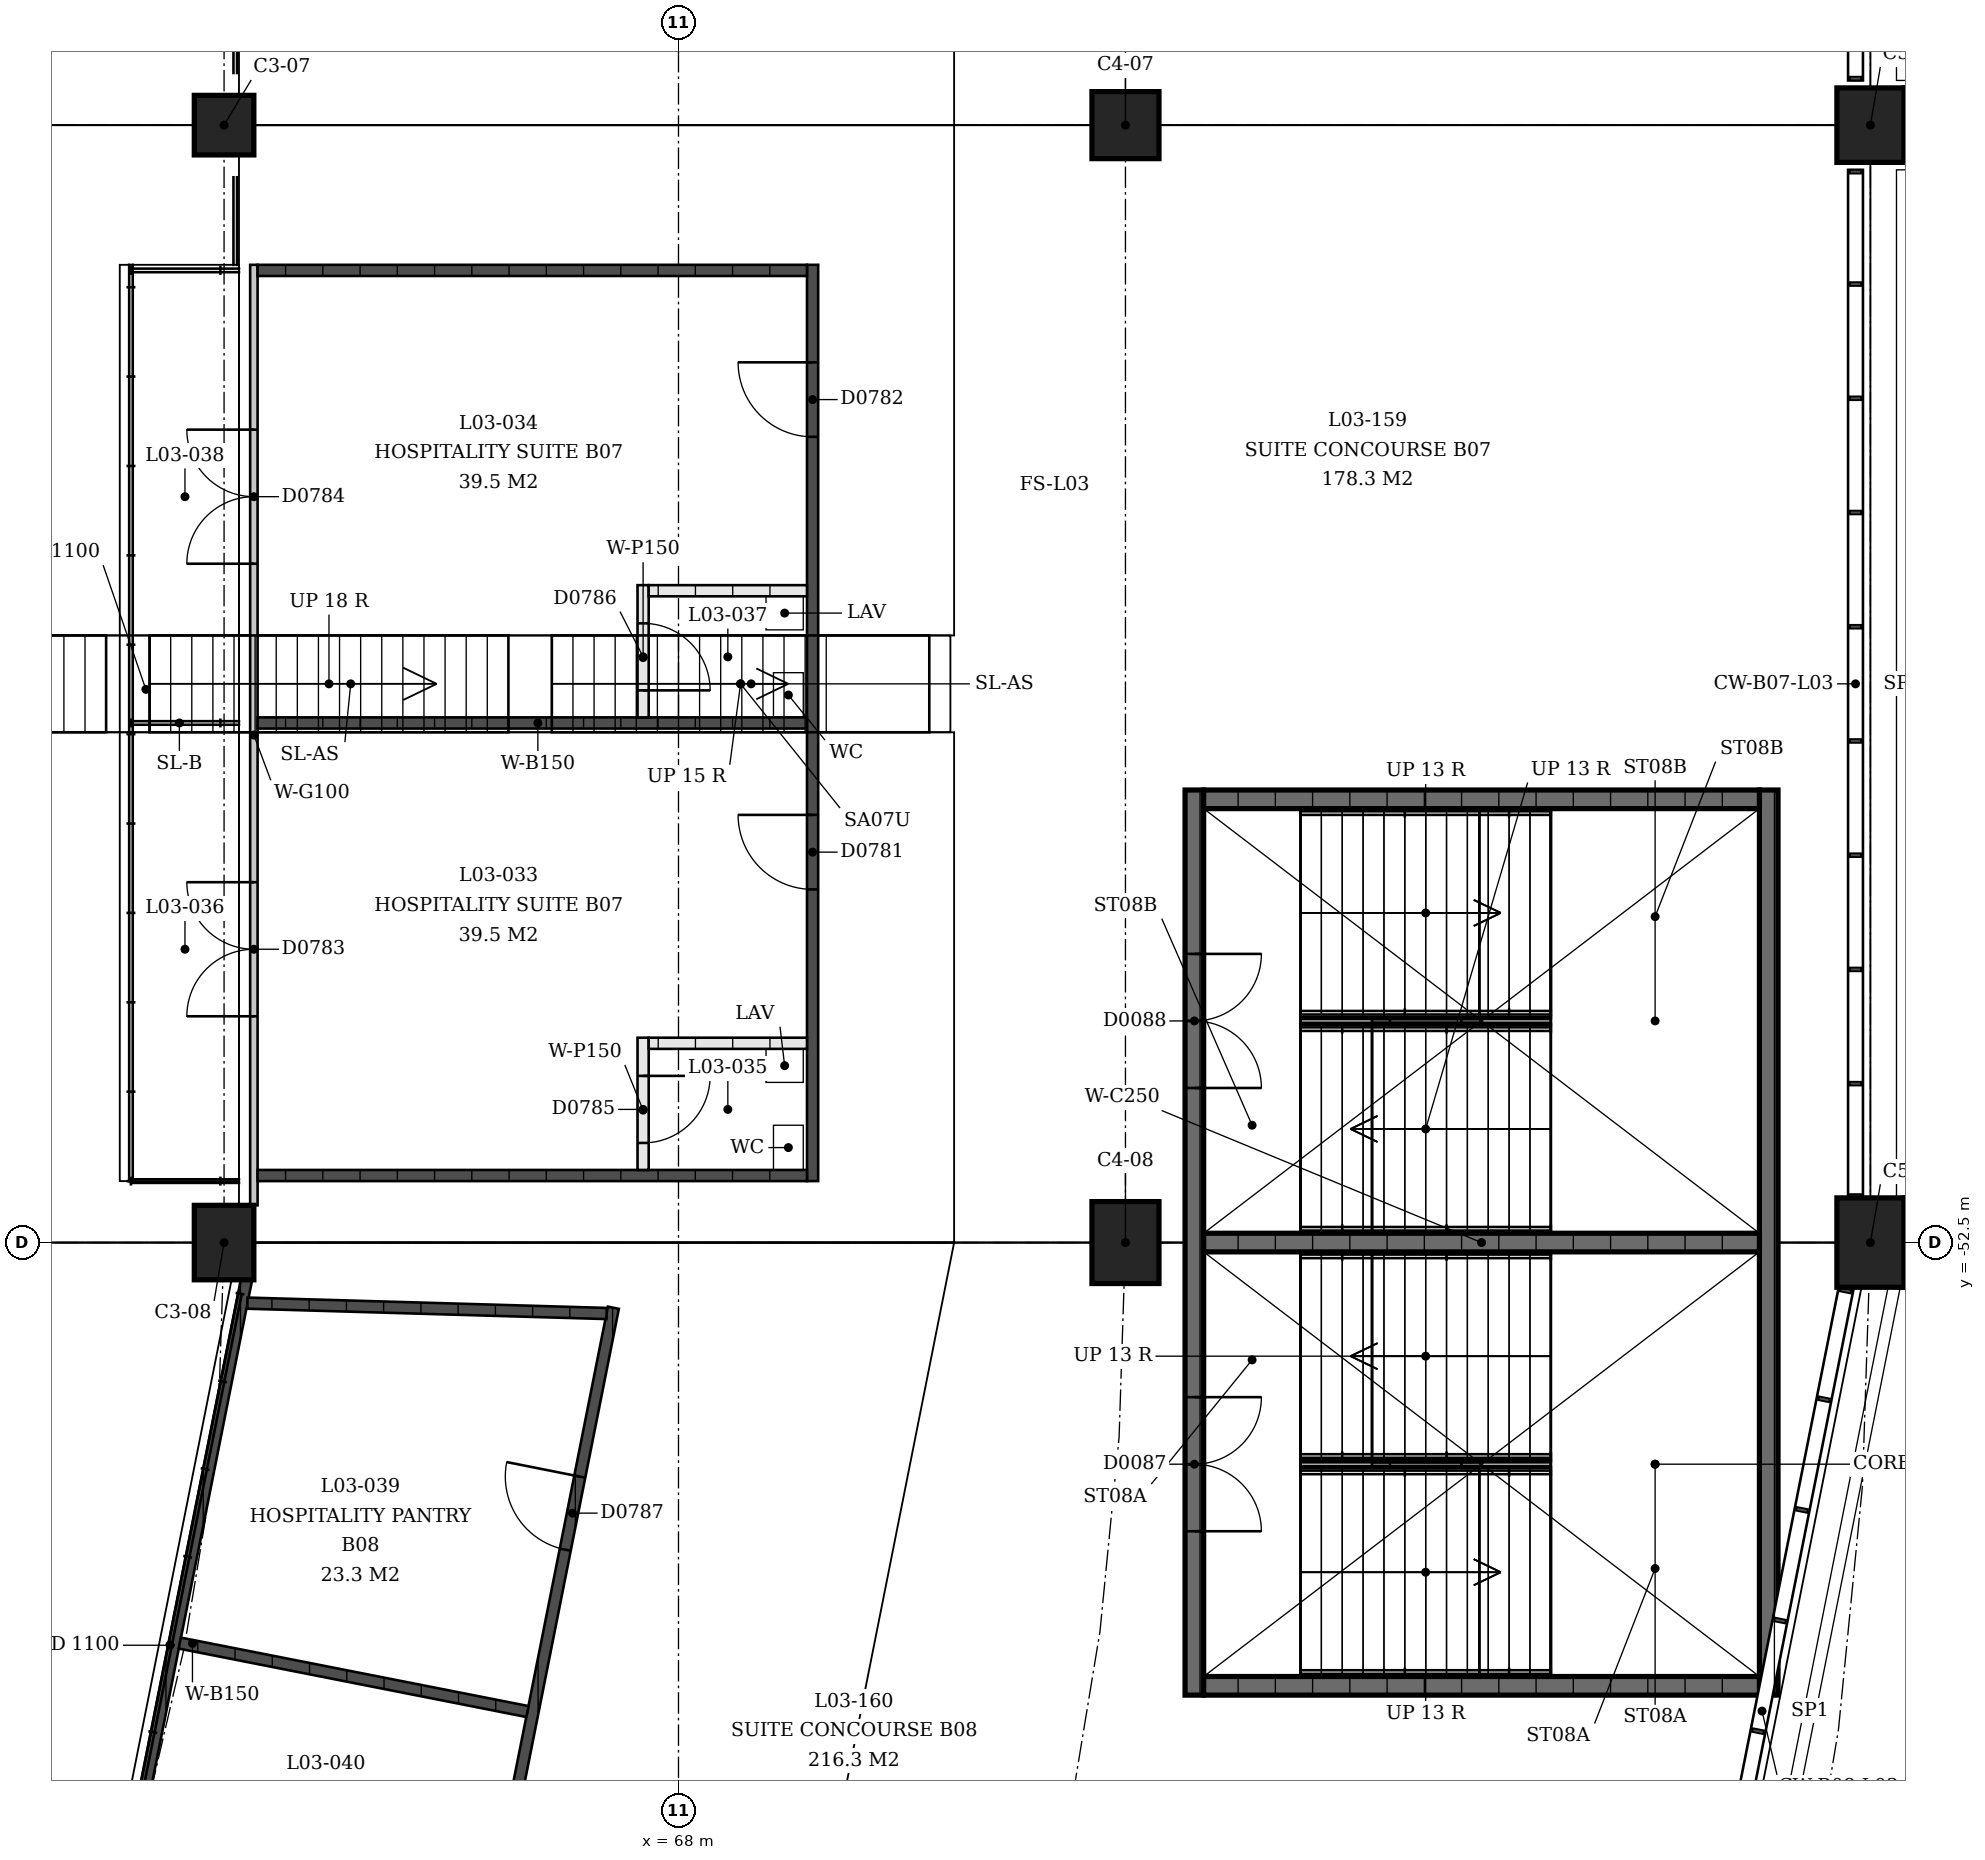
"""IFC4 building model, lengths in metres.
Left out: names, types, materials, properties, quantities, classifications, styles, units other than length and angle.
Written with IfcOpenShell. Run it as: python <this file> out.ifc"""

import sys

from ifc_helpers import new_model, si_unit, direction, frame, frame_2d, origin, origin_2d, place, context, subcontext, project, spatial, rectangle, extrude, element, fill, save


model = new_model("IFC4")
c1 = context("Model", 3, precision=1e-05, world=origin(), true_north=direction((0.0, 1.0)))
c2 = subcontext(c1, "Body", "Model", "MODEL_VIEW")
j1 = project(units=[si_unit("LENGTHUNIT", "METRE"), si_unit("PLANEANGLEUNIT", "RADIAN")], contexts=[c1])
p1 = place(None, origin())
s1 = spatial("IfcSite", under=j1, at=p1, CompositionType="ELEMENT")
p2 = place(p1, origin())
s2 = spatial("IfcBuilding", under=s1, at=p2, CompositionType="ELEMENT")
p3 = place(p2, frame((0.0, 0.0, 13.5)))
s3 = spatial("IfcBuildingStorey", under=s2, at=p3, CompositionType="ELEMENT", Elevation=13.5)
p4 = place(p3, frame((61.9, -37.5, 0.0), z_axis=(0.0, 0.0, 1.0), x_axis=(0.0, 1.0, 0.0)))
e1 = element("IfcColumn", 1, at=p4, inside=s3, PredefinedType="COLUMN", context=c2, shape_type="SweptSolid", body=[
    extrude(rectangle(XDim=0.8, YDim=0.8, at=origin_2d()), origin(), (0.0, 0.0, 1.0), 2.033),
])
p5 = place(p3, frame((74.0, -37.5, 0.0), z_axis=(0.0, 0.0, 1.0), x_axis=(0.0, 1.0, 0.0)))
e2 = element("IfcColumn", 2, at=p5, inside=s3, PredefinedType="COLUMN", context=c2, shape_type="SweptSolid", body=[
    extrude(rectangle(XDim=0.9, YDim=0.9, at=origin_2d()), origin(), (0.0, 0.0, 1.0), 4.5),
])
p6 = place(p3, frame((84.0, -37.5, 0.0), z_axis=(0.0, 0.0, 1.0), x_axis=(0.0, 1.0, 0.0)))
e3 = element("IfcColumn", 3, at=p6, inside=s3, PredefinedType="COLUMN", context=c2, shape_type="SweptSolid", body=[
    extrude(rectangle(XDim=1.0, YDim=0.9, at=origin_2d()), origin(), (0.0, 0.0, 1.0), 4.5),
])
p7 = place(p3, frame((61.9, -52.5, 0.0), z_axis=(0.0, 0.0, 1.0), x_axis=(0.0, 1.0, 0.0)))
e4 = element("IfcColumn", 4, at=p7, inside=s3, PredefinedType="COLUMN", context=c2, shape_type="SweptSolid", body=[
    extrude(rectangle(XDim=1.0, YDim=0.8, at=origin_2d()), origin(), (0.0, 0.0, 1.0), 2.033),
])
p8 = place(p3, frame((74.0, -52.5, 0.0), z_axis=(0.0, 0.0, 1.0), x_axis=(0.0, 1.0, 0.0)))
e5 = element("IfcColumn", 5, at=p8, inside=s3, PredefinedType="COLUMN", context=c2, shape_type="SweptSolid", body=[
    extrude(rectangle(XDim=1.1, YDim=0.9, at=origin_2d()), origin(), (0.0, 0.0, 1.0), 4.5),
])
p9 = place(p3, frame((84.0, -52.5, 0.0), z_axis=(0.0, 0.0, 1.0), x_axis=(0.0, 1.0, 0.0)))
e6 = element("IfcColumn", 6, at=p9, inside=s3, PredefinedType="COLUMN", context=c2, shape_type="SweptSolid", body=[
    extrude(rectangle(XDim=1.2, YDim=0.9, at=origin_2d()), origin(), (0.0, 0.0, 1.0), 4.5),
])
p10 = place(p3, frame((74.925, -58.575, 0.0), z_axis=(0.0, 0.0, 1.0), x_axis=(0.0, 1.0, 0.0)))
e7 = element("IfcWall", 7, at=p10, inside=s3, PredefinedType="SHEAR", context=c2, shape_type="SweptSolid", body=[
    extrude(rectangle(XDim=12.15, YDim=0.25, at=frame_2d((6.075, 0.0))), origin(), (0.0, 0.0, 1.0), 4.09),
])
p11 = place(p10, frame((2.2, 0.0, 0.0)))
e8 = element("IfcOpeningElement", 8, at=p11, cuts=e7, PredefinedType="OPENING", context=c2, shape_type="SweptSolid", body=[
    extrude(rectangle(XDim=1.8, YDim=2.1, at=frame_2d((0.9, 1.05))), frame((0.0, 0.125, 0.0), z_axis=(0.0, -1.0, 0.0), x_axis=(1.0, 0.0, 0.0)), (0.0, 0.0, 1.0), 0.25),
])
p12 = place(p10, frame((8.15, 0.0, 0.0)))
e9 = element("IfcOpeningElement", 9, at=p12, cuts=e7, PredefinedType="OPENING", context=c2, shape_type="SweptSolid", body=[
    extrude(rectangle(XDim=1.8, YDim=2.1, at=frame_2d((0.9, 1.05))), frame((0.0, 0.125, 0.0), z_axis=(0.0, -1.0, 0.0), x_axis=(1.0, 0.0, 0.0)), (0.0, 0.0, 1.0), 0.25),
])
p13 = place(p3, frame((82.635, -58.575, 0.0), z_axis=(0.0, 0.0, 1.0), x_axis=(0.0, 1.0, 0.0)))
e10 = element("IfcWall", 10, at=p13, inside=s3, PredefinedType="SHEAR", context=c2, shape_type="SweptSolid", body=[
    extrude(rectangle(XDim=12.15, YDim=0.25, at=frame_2d((6.075, 0.0))), origin(), (0.0, 0.0, 1.0), 4.09),
])
for number, where, z_axis, x_axis in (
    (11, (75.05, -58.45, 0.0), (0.0, 0.0, 1.0), (1.0, 0.0, 0.0)),
    (12, (75.05, -46.55, 0.0), (0.0, 0.0, 1.0), (1.0, 0.0, 0.0)),
    (13, (75.05, -52.5, 0.0), (0.0, 0.0, 1.0), (1.0, 0.0, 0.0)),
):
    element("IfcWall", number, at=place(p3, frame(where, z_axis=z_axis, x_axis=x_axis)), inside=s3, PredefinedType="SHEAR", context=c2, shape_type="SweptSolid", body=[
        extrude(rectangle(XDim=7.46, YDim=0.25, at=frame_2d((3.73, 0.0))), origin(), (0.0, 0.0, 1.0), 4.09),
    ])
p14 = place(p3, frame((62.3, -52.0, 0.0), z_axis=(0.0, 0.0, 1.0), x_axis=(0.0, 1.0, 0.0)))
e14 = element("IfcWall", 14, at=p14, inside=s3, PredefinedType="PARTITIONING", context=c2, shape_type="SweptSolid", body=[
    extrude(rectangle(XDim=12.625, YDim=0.1, at=frame_2d((6.312, 0.0))), origin(), (0.0, 0.0, 1.0), 3.0),
])
p15 = place(p14, frame((2.538, 0.0, 0.0)))
e15 = element("IfcOpeningElement", 15, at=p15, cuts=e14, PredefinedType="OPENING", context=c2, shape_type="SweptSolid", body=[
    extrude(rectangle(XDim=1.8, YDim=2.1, at=frame_2d((0.9, 1.05))), frame((0.0, 0.05, 0.0), z_axis=(0.0, -1.0, 0.0), x_axis=(1.0, 0.0, 0.0)), (0.0, 0.0, 1.0), 0.1),
])
p16 = place(p14, frame((8.613, 0.0, 0.0)))
e16 = element("IfcOpeningElement", 16, at=p16, cuts=e14, PredefinedType="OPENING", context=c2, shape_type="SweptSolid", body=[
    extrude(rectangle(XDim=1.8, YDim=2.1, at=frame_2d((0.9, 1.05))), frame((0.0, 0.05, 0.0), z_axis=(0.0, -1.0, 0.0), x_axis=(1.0, 0.0, 0.0)), (0.0, 0.0, 1.0), 0.1),
])
p17 = place(p3, frame((69.8, -51.675, 0.0), z_axis=(0.0, 0.0, 1.0), x_axis=(0.0, 1.0, 0.0)))
e17 = element("IfcWall", 17, at=p17, inside=s3, PredefinedType="SOLIDWALL", context=c2, shape_type="SweptSolid", body=[
    extrude(rectangle(XDim=12.3, YDim=0.15, at=frame_2d((6.15, 0.0))), origin(), (0.0, 0.0, 1.0), 3.0),
])
p18 = place(p17, frame((3.916, 0.0, 0.0)))
e18 = element("IfcOpeningElement", 18, at=p18, cuts=e17, PredefinedType="OPENING", context=c2, shape_type="SweptSolid", body=[
    extrude(rectangle(XDim=1.0, YDim=2.1, at=frame_2d((0.5, 1.05))), frame((0.0, 0.075, 0.0), z_axis=(0.0, -1.0, 0.0), x_axis=(1.0, 0.0, 0.0)), (0.0, 0.0, 1.0), 0.15),
])
p19 = place(p17, frame((9.991, 0.0, 0.0)))
e19 = element("IfcOpeningElement", 19, at=p19, cuts=e17, PredefinedType="OPENING", context=c2, shape_type="SweptSolid", body=[
    extrude(rectangle(XDim=1.0, YDim=2.1, at=frame_2d((0.5, 1.05))), frame((0.0, 0.075, 0.0), z_axis=(0.0, -1.0, 0.0), x_axis=(1.0, 0.0, 0.0)), (0.0, 0.0, 1.0), 0.15),
])
for number, where, z_axis, x_axis in (
    (20, (62.35, -51.6, 0.0), (0.0, 0.0, 1.0), (1.0, 0.0, 0.0)),
    (21, (62.35, -45.525, 0.0), (0.0, 0.0, 1.0), (1.0, 0.0, 0.0)),
    (22, (62.35, -39.45, 0.0), (0.0, 0.0, 1.0), (1.0, 0.0, 0.0)),
):
    element("IfcWall", number, at=place(p3, frame(where, z_axis=z_axis, x_axis=x_axis)), inside=s3, PredefinedType="SOLIDWALL", context=c2, shape_type="SweptSolid", body=[
        extrude(rectangle(XDim=7.375, YDim=0.15, at=frame_2d((3.688, 0.0))), origin(), (0.0, 0.0, 1.0), 3.0),
    ])
p20 = place(p3, frame((67.525, -51.525, 0.0), z_axis=(0.0, 0.0, 1.0), x_axis=(0.0, 1.0, 0.0)))
e23 = element("IfcWall", 23, at=p20, inside=s3, PredefinedType="PARTITIONING", context=c2, shape_type="SweptSolid", body=[
    extrude(rectangle(XDim=1.775, YDim=0.15, at=frame_2d((0.887, 0.0))), origin(), (0.0, 0.0, 1.0), 3.0),
])
p21 = place(p20, frame((0.363, 0.0, 0.0)))
e24 = element("IfcOpeningElement", 24, at=p21, cuts=e23, PredefinedType="OPENING", context=c2, shape_type="SweptSolid", body=[
    extrude(rectangle(XDim=0.9, YDim=2.1, at=frame_2d((0.45, 1.05))), frame((0.0, 0.075, 0.0), z_axis=(0.0, -1.0, 0.0), x_axis=(1.0, 0.0, 0.0)), (0.0, 0.0, 1.0), 0.15),
])
p22 = place(p3, frame((67.6, -49.825, 0.0), z_axis=(0.0, 0.0, 1.0), x_axis=(1.0, 0.0, 0.0)))
e25 = element("IfcWall", 25, at=p22, inside=s3, PredefinedType="PARTITIONING", context=c2, shape_type="SweptSolid", body=[
    extrude(rectangle(XDim=2.125, YDim=0.15, at=frame_2d((1.062, 0.0))), origin(), (0.0, 0.0, 1.0), 3.0),
])
p23 = place(p3, frame((67.525, -45.45, 0.0), z_axis=(0.0, 0.0, 1.0), x_axis=(0.0, 1.0, 0.0)))
e26 = element("IfcWall", 26, at=p23, inside=s3, PredefinedType="PARTITIONING", context=c2, shape_type="SweptSolid", body=[
    extrude(rectangle(XDim=1.775, YDim=0.15, at=frame_2d((0.887, 0.0))), origin(), (0.0, 0.0, 1.0), 3.0),
])
p24 = place(p23, frame((0.363, 0.0, 0.0)))
e27 = element("IfcOpeningElement", 27, at=p24, cuts=e26, PredefinedType="OPENING", context=c2, shape_type="SweptSolid", body=[
    extrude(rectangle(XDim=0.9, YDim=2.1, at=frame_2d((0.45, 1.05))), frame((0.0, 0.075, 0.0), z_axis=(0.0, -1.0, 0.0), x_axis=(1.0, 0.0, 0.0)), (0.0, 0.0, 1.0), 0.15),
])
p25 = place(p3, frame((67.6, -43.75, 0.0), z_axis=(0.0, 0.0, 1.0), x_axis=(1.0, 0.0, 0.0)))
e28 = element("IfcWall", 28, at=p25, inside=s3, PredefinedType="PARTITIONING", context=c2, shape_type="SweptSolid", body=[
    extrude(rectangle(XDim=2.125, YDim=0.15, at=frame_2d((1.062, 0.0))), origin(), (0.0, 0.0, 1.0), 3.0),
])
p26 = place(p3, frame((62.2, -53.0, 0.0), z_axis=(0.0, 0.0, 1.0), x_axis=(-0.195076647143, -0.980788000406, 0.0)))
e29 = element("IfcWall", 29, at=p26, inside=s3, PredefinedType="SOLIDWALL", context=c2, shape_type="SweptSolid", body=[
    extrude(rectangle(XDim=9.667, YDim=0.15, at=frame_2d((4.833, 0.0))), origin(), (0.0, 0.0, 1.0), 3.0),
])
p27 = place(p3, frame((67.126, -53.375, 0.0), z_axis=(0.0, 0.0, 1.0), x_axis=(-0.195090821685, -0.980785181013, 0.0)))
e30 = element("IfcWall", 30, at=p27, inside=s3, PredefinedType="SOLIDWALL", context=c2, shape_type="SweptSolid", body=[
    extrude(rectangle(XDim=11.083, YDim=0.15, at=frame_2d((5.541, 0.0))), origin(), (0.0, 0.0, 1.0), 3.0),
])
p28 = place(p27, frame((2.311, 0.0, 0.0)))
e31 = element("IfcOpeningElement", 31, at=p28, cuts=e30, PredefinedType="OPENING", context=c2, shape_type="SweptSolid", body=[
    extrude(rectangle(XDim=1.0, YDim=2.1, at=frame_2d((0.5, 1.05))), frame((0.0, 0.075, 0.0), z_axis=(0.0, -1.0, 0.0), x_axis=(1.0, 0.0, 0.0)), (0.0, 0.0, 1.0), 0.15),
])
p29 = place(p27, frame((7.771, 0.0, 0.0)))
e32 = element("IfcOpeningElement", 32, at=p29, cuts=e30, PredefinedType="OPENING", context=c2, shape_type="SweptSolid", body=[
    extrude(rectangle(XDim=1.0, YDim=2.1, at=frame_2d((0.5, 1.05))), frame((0.0, 0.075, 0.0), z_axis=(0.0, -1.0, 0.0), x_axis=(1.0, 0.0, 0.0)), (0.0, 0.0, 1.0), 0.15),
])
p30 = place(p3, frame((62.213, -53.313, 0.0), z_axis=(0.0, 0.0, 1.0), x_axis=(0.999585372371, -0.028793807365, 0.0)))
e33 = element("IfcWall", 33, at=p30, inside=s3, PredefinedType="SOLIDWALL", context=c2, shape_type="SweptSolid", body=[
    extrude(rectangle(XDim=4.824, YDim=0.15, at=frame_2d((2.412, 0.0))), origin(), (0.0, 0.0, 1.0), 3.0),
])
p31 = place(p3, frame((61.306, -57.876, 0.0), z_axis=(0.0, 0.0, 1.0), x_axis=(0.98116065749, -0.193193592529, 0.0)))
e34 = element("IfcWall", 34, at=p31, inside=s3, PredefinedType="SOLIDWALL", context=c2, shape_type="SweptSolid", body=[
    extrude(rectangle(XDim=4.757, YDim=0.15, at=frame_2d((2.378, 0.0))), origin(), (0.0, 0.0, 1.0), 3.0),
])
p32 = place(p11, origin())
e35 = element("IfcDoor", 35, at=p32, inside=s3, OperationType="DOUBLE_DOOR_SINGLE_SWING", PredefinedType="DOOR", context=c2, shape_type="SweptSolid", body=[
    extrude(rectangle(XDim=1.8, YDim=2.1, at=frame_2d((0.9, 1.05))), frame((0.0, 0.025, 0.0), z_axis=(0.0, -1.0, 0.0), x_axis=(1.0, 0.0, 0.0)), (0.0, 0.0, 1.0), 0.05),
])
fill(e8, e35)
p33 = place(p12, origin())
e36 = element("IfcDoor", 36, at=p33, inside=s3, OperationType="DOUBLE_DOOR_SINGLE_SWING", PredefinedType="DOOR", context=c2, shape_type="SweptSolid", body=[
    extrude(rectangle(XDim=1.8, YDim=2.1, at=frame_2d((0.9, 1.05))), frame((0.0, 0.025, 0.0), z_axis=(0.0, -1.0, 0.0), x_axis=(1.0, 0.0, 0.0)), (0.0, 0.0, 1.0), 0.05),
])
fill(e9, e36)
p34 = place(p18, origin())
e37 = element("IfcDoor", 37, at=p34, inside=s3, OperationType="SINGLE_SWING_LEFT", PredefinedType="DOOR", context=c2, shape_type="SweptSolid", body=[
    extrude(rectangle(XDim=1.0, YDim=2.1, at=frame_2d((0.5, 1.05))), frame((0.0, 0.025, 0.0), z_axis=(0.0, -1.0, 0.0), x_axis=(1.0, 0.0, 0.0)), (0.0, 0.0, 1.0), 0.05),
])
fill(e18, e37)
p35 = place(p19, origin())
e38 = element("IfcDoor", 38, at=p35, inside=s3, OperationType="SINGLE_SWING_LEFT", PredefinedType="DOOR", context=c2, shape_type="SweptSolid", body=[
    extrude(rectangle(XDim=1.0, YDim=2.1, at=frame_2d((0.5, 1.05))), frame((0.0, 0.025, 0.0), z_axis=(0.0, -1.0, 0.0), x_axis=(1.0, 0.0, 0.0)), (0.0, 0.0, 1.0), 0.05),
])
fill(e19, e38)
p36 = place(p15, origin())
e39 = element("IfcDoor", 39, at=p36, inside=s3, OperationType="DOUBLE_DOOR_SINGLE_SWING", PredefinedType="DOOR", context=c2, shape_type="SweptSolid", body=[
    extrude(rectangle(XDim=1.8, YDim=2.1, at=frame_2d((0.9, 1.05))), frame((0.0, 0.025, 0.0), z_axis=(0.0, -1.0, 0.0), x_axis=(1.0, 0.0, 0.0)), (0.0, 0.0, 1.0), 0.05),
])
fill(e15, e39)
p37 = place(p16, origin())
e40 = element("IfcDoor", 40, at=p37, inside=s3, OperationType="DOUBLE_DOOR_SINGLE_SWING", PredefinedType="DOOR", context=c2, shape_type="SweptSolid", body=[
    extrude(rectangle(XDim=1.8, YDim=2.1, at=frame_2d((0.9, 1.05))), frame((0.0, 0.025, 0.0), z_axis=(0.0, -1.0, 0.0), x_axis=(1.0, 0.0, 0.0)), (0.0, 0.0, 1.0), 0.05),
])
fill(e16, e40)
p38 = place(p21, origin())
e41 = element("IfcDoor", 41, at=p38, inside=s3, OperationType="SINGLE_SWING_RIGHT", PredefinedType="DOOR", context=c2, shape_type="SweptSolid", body=[
    extrude(rectangle(XDim=0.9, YDim=2.1, at=frame_2d((0.45, 1.05))), frame((0.0, 0.025, 0.0), z_axis=(0.0, -1.0, 0.0), x_axis=(1.0, 0.0, 0.0)), (0.0, 0.0, 1.0), 0.05),
])
fill(e24, e41)
p39 = place(p24, origin())
e42 = element("IfcDoor", 42, at=p39, inside=s3, OperationType="SINGLE_SWING_LEFT", PredefinedType="DOOR", context=c2, shape_type="SweptSolid", body=[
    extrude(rectangle(XDim=0.9, YDim=2.1, at=frame_2d((0.45, 1.05))), frame((0.0, 0.025, 0.0), z_axis=(0.0, -1.0, 0.0), x_axis=(1.0, 0.0, 0.0)), (0.0, 0.0, 1.0), 0.05),
])
fill(e27, e42)
p40 = place(p28, origin())
e43 = element("IfcDoor", 43, at=p40, inside=s3, OperationType="SINGLE_SWING_LEFT", PredefinedType="DOOR", context=c2, shape_type="SweptSolid", body=[
    extrude(rectangle(XDim=1.0, YDim=2.1, at=frame_2d((0.5, 1.05))), frame((0.0, 0.025, 0.0), z_axis=(0.0, -1.0, 0.0), x_axis=(1.0, 0.0, 0.0)), (0.0, 0.0, 1.0), 0.05),
])
fill(e31, e43)
save(model, sys.argv[1])
